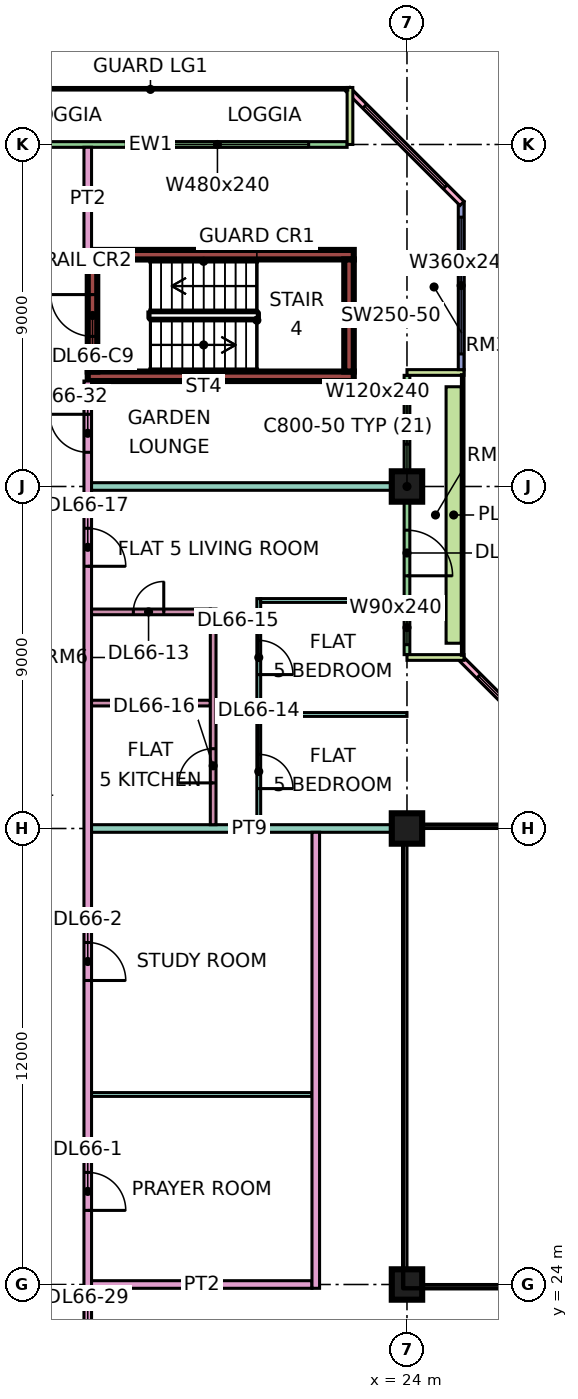
"""IFC4 building model, lengths in metres.
Left out: names, types, materials, properties, quantities, classifications, styles, units other than length and angle.
Written with IfcOpenShell. Run it as: python <this file> out.ifc"""

import sys

from ifc_helpers import new_model, si_unit, direction, frame, frame_2d, origin, origin_2d, place, context, subcontext, project, spatial, rectangle, extrude, element, fill, save


model = new_model("IFC4")
c1 = context("Model", 3, precision=1e-05, world=origin(), true_north=direction((0.0, 1.0)))
c2 = subcontext(c1, "Body", "Model", "MODEL_VIEW")
j1 = project(units=[si_unit("LENGTHUNIT", "METRE"), si_unit("PLANEANGLEUNIT", "RADIAN")], contexts=[c1])
p1 = place(None, origin())
s1 = spatial("IfcSite", under=j1, at=p1, CompositionType="ELEMENT")
p2 = place(p1, origin())
s2 = spatial("IfcBuilding", under=s1, at=p2, CompositionType="ELEMENT")
p3 = place(p2, frame((0.0, 0.0, 284.65)))
s3 = spatial("IfcBuildingStorey", under=s2, at=p3, CompositionType="ELEMENT", Elevation=284.65)
for number, where, z_axis, x_axis in (
    (1, (24.0, 24.0, 0.0), (0.0, 0.0, 1.0), (1.0, 0.0, 0.0)),
    (2, (24.0, 36.0, 0.0), (0.0, 0.0, 1.0), (1.0, 0.0, 0.0)),
    (3, (24.0, 45.0, 0.0), (0.0, 0.0, 1.0), (1.0, 0.0, 0.0)),
):
    element("IfcColumn", number, at=place(p3, frame(where, z_axis=z_axis, x_axis=x_axis)), inside=s3, PredefinedType="COLUMN", context=c2, shape_type="SweptSolid", body=[
        extrude(rectangle(XDim=0.8, YDim=0.8, at=origin_2d()), origin(), (0.0, 0.0, 1.0), 3.75),
    ])
for number, where, z_axis, x_axis in (
    (4, (15.6, 47.9, 0.0), (0.0, 0.0, 1.0), (1.0, 0.0, 0.0)),
    (5, (15.6, 51.1, 0.0), (0.0, 0.0, 1.0), (1.0, 0.0, 0.0)),
):
    element("IfcWall", number, at=place(p3, frame(where, z_axis=z_axis, x_axis=x_axis)), inside=s3, PredefinedType="SHEAR", context=c2, shape_type="SweptSolid", body=[
        extrude(rectangle(XDim=7.0, YDim=0.25, at=frame_2d((3.5, 0.0))), origin(), (0.0, 0.0, 1.0), 3.75),
    ])
p4 = place(p3, frame((15.725, 48.025, 0.0), z_axis=(0.0, 0.0, 1.0), x_axis=(0.0, 1.0, 0.0)))
e6 = element("IfcWall", 6, at=p4, inside=s3, PredefinedType="SHEAR", context=c2, shape_type="SweptSolid", body=[
    extrude(rectangle(XDim=2.95, YDim=0.25, at=frame_2d((1.475, 0.0))), origin(), (0.0, 0.0, 1.0), 3.75),
])
p5 = place(p4, frame((0.925, 0.0, 0.0)))
e7 = element("IfcOpeningElement", 7, at=p5, cuts=e6, PredefinedType="OPENING", context=c2, shape_type="SweptSolid", body=[
    extrude(rectangle(XDim=1.1, YDim=2.2, at=frame_2d((0.55, 1.1))), frame((0.0, 0.135, 0.0), z_axis=(0.0, -1.0, 0.0), x_axis=(1.0, 0.0, 0.0)), (0.0, 0.0, 1.0), 0.27),
])
p6 = place(p3, frame((22.475, 48.025, 0.0), z_axis=(0.0, 0.0, 1.0), x_axis=(0.0, 1.0, 0.0)))
e8 = element("IfcWall", 8, at=p6, inside=s3, PredefinedType="SHEAR", context=c2, shape_type="SweptSolid", body=[
    extrude(rectangle(XDim=2.95, YDim=0.25, at=frame_2d((1.475, 0.0))), origin(), (0.0, 0.0, 1.0), 3.75),
])
p7 = place(p3, frame((28.447, 37.447, 0.0), z_axis=(0.0, 0.0, 1.0), x_axis=(-0.707106781187, 0.707106781187, 0.0)))
e9 = element("IfcWall", 9, at=p7, inside=s3, PredefinedType="SOLIDWALL", context=c2, shape_type="SweptSolid", body=[
    extrude(rectangle(XDim=4.243, YDim=0.15, at=frame_2d((2.121, 0.0))), origin(), (0.0, 0.0, 1.0), 3.35),
])
p8 = place(p7, frame((0.621, 0.0, 0.45)))
e10 = element("IfcOpeningElement", 10, at=p8, cuts=e9, PredefinedType="OPENING", context=c2, shape_type="SweptSolid", body=[
    extrude(rectangle(XDim=3.0, YDim=2.4, at=frame_2d((1.5, 1.2))), frame((0.0, 0.085, 0.0), z_axis=(0.0, -1.0, 0.0), x_axis=(1.0, 0.0, 0.0)), (0.0, 0.0, 1.0), 0.17),
])
p9 = place(p3, frame((24.0, 40.575, 0.0), z_axis=(0.0, 0.0, 1.0), x_axis=(0.0, 1.0, 0.0)))
e11 = element("IfcWall", 11, at=p9, inside=s3, PredefinedType="SOLIDWALL", context=c2, shape_type="SweptSolid", body=[
    extrude(rectangle(XDim=7.35, YDim=0.15, at=frame_2d((3.675, 0.0))), origin(), (0.0, 0.0, 1.0), 3.35),
])
p10 = place(p9, frame((0.262, 0.0, 0.45)))
e12 = element("IfcOpeningElement", 12, at=p10, cuts=e11, PredefinedType="OPENING", context=c2, shape_type="SweptSolid", body=[
    extrude(rectangle(XDim=0.9, YDim=2.4, at=frame_2d((0.45, 1.2))), frame((0.0, 0.085, 0.0), z_axis=(0.0, -1.0, 0.0), x_axis=(1.0, 0.0, 0.0)), (0.0, 0.0, 1.0), 0.17),
])
p11 = place(p9, frame((2.075, 0.0, 0.0)))
e13 = element("IfcOpeningElement", 13, at=p11, cuts=e11, PredefinedType="OPENING", context=c2, shape_type="SweptSolid", body=[
    extrude(rectangle(XDim=1.2, YDim=2.4, at=frame_2d((0.6, 1.2))), frame((0.0, 0.085, 0.0), z_axis=(0.0, -1.0, 0.0), x_axis=(1.0, 0.0, 0.0)), (0.0, 0.0, 1.0), 0.17),
])
p12 = place(p9, frame((5.538, 0.0, 0.45)))
e14 = element("IfcOpeningElement", 14, at=p12, cuts=e11, PredefinedType="OPENING", context=c2, shape_type="SweptSolid", body=[
    extrude(rectangle(XDim=1.2, YDim=2.4, at=frame_2d((0.6, 1.2))), frame((0.0, 0.085, 0.0), z_axis=(0.0, -1.0, 0.0), x_axis=(1.0, 0.0, 0.0)), (0.0, 0.0, 1.0), 0.17),
])
for number, where, z_axis, x_axis in (
    (15, (25.5, 40.5, 0.0), (0.0, 0.0, 1.0), (-1.0, 0.0, 0.0)),
    (16, (25.5, 48.0, 0.0), (0.0, 0.0, 1.0), (-1.0, 0.0, 0.0)),
):
    element("IfcWall", number, at=place(p3, frame(where, z_axis=z_axis, x_axis=x_axis)), inside=s3, PredefinedType="SOLIDWALL", context=c2, shape_type="SweptSolid", body=[
        extrude(rectangle(XDim=1.5, YDim=0.15, at=frame_2d((0.75, 0.0))), origin(), (0.0, 0.0, 1.0), 3.35),
    ])
p13 = place(p3, frame((25.425, 48.075, 0.0), z_axis=(0.0, 0.0, 1.0), x_axis=(0.0, 1.0, 0.0)))
e17 = element("IfcWall", 17, at=p13, inside=s3, PredefinedType="SOLIDWALL", context=c2, shape_type="SweptSolid", body=[
    extrude(rectangle(XDim=4.425, YDim=0.15, at=frame_2d((2.212, 0.0))), origin(), (0.0, 0.0, 1.0), 3.35),
])
p14 = place(p13, frame((0.413, 0.0, 0.45)))
e18 = element("IfcOpeningElement", 18, at=p14, cuts=e17, PredefinedType="OPENING", context=c2, shape_type="SweptSolid", body=[
    extrude(rectangle(XDim=3.6, YDim=2.4, at=frame_2d((1.8, 1.2))), frame((0.0, 0.085, 0.0), z_axis=(0.0, -1.0, 0.0), x_axis=(1.0, 0.0, 0.0)), (0.0, 0.0, 1.0), 0.17),
])
p15 = place(p3, frame((25.447, 52.447, 0.0), z_axis=(0.0, 0.0, 1.0), x_axis=(-0.707106781187, 0.707106781187, 0.0)))
e19 = element("IfcWall", 19, at=p15, inside=s3, PredefinedType="SOLIDWALL", context=c2, shape_type="SweptSolid", body=[
    extrude(rectangle(XDim=4.243, YDim=0.15, at=frame_2d((2.121, 0.0))), origin(), (0.0, 0.0, 1.0), 3.35),
])
p16 = place(p15, frame((0.621, 0.0, 0.45)))
e20 = element("IfcOpeningElement", 20, at=p16, cuts=e19, PredefinedType="OPENING", context=c2, shape_type="SweptSolid", body=[
    extrude(rectangle(XDim=3.0, YDim=2.4, at=frame_2d((1.5, 1.2))), frame((0.0, 0.085, 0.0), z_axis=(0.0, -1.0, 0.0), x_axis=(1.0, 0.0, 0.0)), (0.0, 0.0, 1.0), 0.17),
])
p17 = place(p3, frame((22.425, 54.0, 0.0), z_axis=(0.0, 0.0, 1.0), x_axis=(-1.0, 0.0, 0.0)))
e21 = element("IfcWall", 21, at=p17, inside=s3, PredefinedType="SOLIDWALL", context=c2, shape_type="SweptSolid", body=[
    extrude(rectangle(XDim=10.35, YDim=0.15, at=frame_2d((5.175, 0.0))), origin(), (0.0, 0.0, 1.0), 3.35),
])
p18 = place(p17, frame((1.012, 0.0, 0.45)))
e22 = element("IfcOpeningElement", 22, at=p18, cuts=e21, PredefinedType="OPENING", context=c2, shape_type="SweptSolid", body=[
    extrude(rectangle(XDim=4.8, YDim=2.4, at=frame_2d((2.4, 1.2))), frame((0.0, 0.085, 0.0), z_axis=(0.0, -1.0, 0.0), x_axis=(1.0, 0.0, 0.0)), (0.0, 0.0, 1.0), 0.17),
])
p19 = place(p3, frame((22.5, 55.5, 0.0), z_axis=(0.0, 0.0, 1.0), x_axis=(0.0, -1.0, 0.0)))
e23 = element("IfcWall", 23, at=p19, inside=s3, PredefinedType="SOLIDWALL", context=c2, shape_type="SweptSolid", body=[
    extrude(rectangle(XDim=1.5, YDim=0.15, at=frame_2d((0.75, 0.0))), origin(), (0.0, 0.0, 1.0), 3.35),
])
p20 = place(p3, frame((25.229, 40.875, 0.0), z_axis=(0.0, 0.0, 1.0), x_axis=(0.0, 1.0, 0.0)))
e24 = element("IfcWall", 24, at=p20, inside=s3, PredefinedType="SOLIDWALL", context=c2, shape_type="SweptSolid", body=[
    extrude(rectangle(XDim=6.75, YDim=0.4, at=frame_2d((3.375, 0.0))), origin(), (0.0, 0.0, 1.0), 0.7),
])
p21 = place(p3, frame((15.6, 20.0, 0.0), z_axis=(0.0, 0.0, 1.0), x_axis=(0.0, 1.0, 0.0)))
e25 = element("IfcWall", 25, at=p21, inside=s3, PredefinedType="PARTITIONING", context=c2, shape_type="SweptSolid", body=[
    extrude(rectangle(XDim=27.775, YDim=0.2, at=frame_2d((13.887, 0.0))), origin(), (0.0, 0.0, 1.0), 3.35),
])
p22 = place(p21, frame((5.95, 0.0, 0.0)))
e26 = element("IfcOpeningElement", 26, at=p22, cuts=e25, PredefinedType="OPENING", context=c2, shape_type="SweptSolid", body=[
    extrude(rectangle(XDim=1.0, YDim=2.1, at=frame_2d((0.5, 1.05))), frame((0.0, 0.11, 0.0), z_axis=(0.0, -1.0, 0.0), x_axis=(1.0, 0.0, 0.0)), (0.0, 0.0, 1.0), 0.22),
])
p23 = place(p21, frame((12.0, 0.0, 0.0)))
e27 = element("IfcOpeningElement", 27, at=p23, cuts=e25, PredefinedType="OPENING", context=c2, shape_type="SweptSolid", body=[
    extrude(rectangle(XDim=1.0, YDim=2.1, at=frame_2d((0.5, 1.05))), frame((0.0, 0.11, 0.0), z_axis=(0.0, -1.0, 0.0), x_axis=(1.0, 0.0, 0.0)), (0.0, 0.0, 1.0), 0.22),
])
p24 = place(p21, frame((22.9, 0.0, 0.0)))
e28 = element("IfcOpeningElement", 28, at=p24, cuts=e25, PredefinedType="OPENING", context=c2, shape_type="SweptSolid", body=[
    extrude(rectangle(XDim=1.0, YDim=2.1, at=frame_2d((0.5, 1.05))), frame((0.0, 0.11, 0.0), z_axis=(0.0, -1.0, 0.0), x_axis=(1.0, 0.0, 0.0)), (0.0, 0.0, 1.0), 0.22),
])
p25 = place(p21, frame((1.15, 0.0, 0.0)))
e29 = element("IfcOpeningElement", 29, at=p25, cuts=e25, PredefinedType="OPENING", context=c2, shape_type="SweptSolid", body=[
    extrude(rectangle(XDim=1.8, YDim=2.1, at=frame_2d((0.9, 1.05))), frame((0.0, 0.11, 0.0), z_axis=(0.0, -1.0, 0.0), x_axis=(1.0, 0.0, 0.0)), (0.0, 0.0, 1.0), 0.22),
])
p26 = place(p21, frame((25.9, 0.0, 0.0)))
e30 = element("IfcOpeningElement", 30, at=p26, cuts=e25, PredefinedType="OPENING", context=c2, shape_type="SweptSolid", body=[
    extrude(rectangle(XDim=1.0, YDim=2.1, at=frame_2d((0.5, 1.05))), frame((0.0, 0.11, 0.0), z_axis=(0.0, -1.0, 0.0), x_axis=(1.0, 0.0, 0.0)), (0.0, 0.0, 1.0), 0.22),
])
p27 = place(p3, frame((15.6, 51.225, 0.0), z_axis=(0.0, 0.0, 1.0), x_axis=(0.0, 1.0, 0.0)))
e31 = element("IfcWall", 31, at=p27, inside=s3, PredefinedType="PARTITIONING", context=c2, shape_type="SweptSolid", body=[
    extrude(rectangle(XDim=2.701, YDim=0.2, at=frame_2d((1.351, 0.0))), origin(), (0.0, 0.0, 1.0), 3.35),
])
p28 = place(p3, frame((15.7, 24.0, 0.0), z_axis=(0.0, 0.0, 1.0), x_axis=(1.0, 0.0, 0.0)))
e32 = element("IfcWall", 32, at=p28, inside=s3, PredefinedType="PARTITIONING", context=c2, shape_type="SweptSolid", body=[
    extrude(rectangle(XDim=5.8, YDim=0.2, at=frame_2d((2.9, 0.0))), origin(), (0.0, 0.0, 1.0), 3.35),
])
p29 = place(p3, frame((15.7, 29.0, 0.0), z_axis=(0.0, 0.0, 1.0), x_axis=(1.0, 0.0, 0.0)))
e33 = element("IfcWall", 33, at=p29, inside=s3, PredefinedType="PARTITIONING", context=c2, shape_type="SweptSolid", body=[
    extrude(rectangle(XDim=5.8, YDim=0.1, at=frame_2d((2.9, 0.0))), origin(), (0.0, 0.0, 1.0), 3.35),
])
p30 = place(p3, frame((15.7, 36.0, 0.0), z_axis=(0.0, 0.0, 1.0), x_axis=(1.0, 0.0, 0.0)))
e34 = element("IfcWall", 34, at=p30, inside=s3, PredefinedType="PARTITIONING", context=c2, shape_type="SweptSolid", body=[
    extrude(rectangle(XDim=8.3, YDim=0.2, at=frame_2d((4.15, 0.0))), origin(), (0.0, 0.0, 1.0), 3.35),
])
p31 = place(p3, frame((15.7, 39.3, 0.0), z_axis=(0.0, 0.0, 1.0), x_axis=(1.0, 0.0, 0.0)))
e35 = element("IfcWall", 35, at=p31, inside=s3, PredefinedType="PARTITIONING", context=c2, shape_type="SweptSolid", body=[
    extrude(rectangle(XDim=3.125, YDim=0.15, at=frame_2d((1.562, 0.0))), origin(), (0.0, 0.0, 1.0), 3.35),
])
p32 = place(p3, frame((15.7, 41.7, 0.0), z_axis=(0.0, 0.0, 1.0), x_axis=(1.0, 0.0, 0.0)))
e36 = element("IfcWall", 36, at=p32, inside=s3, PredefinedType="PARTITIONING", context=c2, shape_type="SweptSolid", body=[
    extrude(rectangle(XDim=3.125, YDim=0.15, at=frame_2d((1.562, 0.0))), origin(), (0.0, 0.0, 1.0), 3.35),
])
p33 = place(p32, frame((1.1, 0.0, 0.0)))
e37 = element("IfcOpeningElement", 37, at=p33, cuts=e36, PredefinedType="OPENING", context=c2, shape_type="SweptSolid", body=[
    extrude(rectangle(XDim=0.8, YDim=2.1, at=frame_2d((0.4, 1.05))), frame((0.0, 0.085, 0.0), z_axis=(0.0, -1.0, 0.0), x_axis=(1.0, 0.0, 0.0)), (0.0, 0.0, 1.0), 0.17),
])
p34 = place(p3, frame((15.7, 45.0, 0.0), z_axis=(0.0, 0.0, 1.0), x_axis=(1.0, 0.0, 0.0)))
e38 = element("IfcWall", 38, at=p34, inside=s3, PredefinedType="PARTITIONING", context=c2, shape_type="SweptSolid", body=[
    extrude(rectangle(XDim=8.226, YDim=0.2, at=frame_2d((4.113, 0.0))), origin(), (0.0, 0.0, 1.0), 3.35),
])
p35 = place(p3, frame((18.9, 36.1, 0.0), z_axis=(0.0, 0.0, 1.0), x_axis=(0.0, 1.0, 0.0)))
e39 = element("IfcWall", 39, at=p35, inside=s3, PredefinedType="PARTITIONING", context=c2, shape_type="SweptSolid", body=[
    extrude(rectangle(XDim=5.675, YDim=0.15, at=frame_2d((2.837, 0.0))), origin(), (0.0, 0.0, 1.0), 3.35),
])
p36 = place(p35, frame((1.1, 0.0, 0.0)))
e40 = element("IfcOpeningElement", 40, at=p36, cuts=e39, PredefinedType="OPENING", context=c2, shape_type="SweptSolid", body=[
    extrude(rectangle(XDim=0.9, YDim=2.1, at=frame_2d((0.45, 1.05))), frame((0.0, 0.085, 0.0), z_axis=(0.0, -1.0, 0.0), x_axis=(1.0, 0.0, 0.0)), (0.0, 0.0, 1.0), 0.17),
])
p37 = place(p3, frame((20.1, 36.1, 0.0), z_axis=(0.0, 0.0, 1.0), x_axis=(0.0, 1.0, 0.0)))
e41 = element("IfcWall", 41, at=p37, inside=s3, PredefinedType="PARTITIONING", context=c2, shape_type="SweptSolid", body=[
    extrude(rectangle(XDim=5.95, YDim=0.1, at=frame_2d((2.975, 0.0))), origin(), (0.0, 0.0, 1.0), 3.35),
])
p38 = place(p37, frame((0.95, 0.0, 0.0)))
e42 = element("IfcOpeningElement", 42, at=p38, cuts=e41, PredefinedType="OPENING", context=c2, shape_type="SweptSolid", body=[
    extrude(rectangle(XDim=0.9, YDim=2.1, at=frame_2d((0.45, 1.05))), frame((0.0, 0.06, 0.0), z_axis=(0.0, -1.0, 0.0), x_axis=(1.0, 0.0, 0.0)), (0.0, 0.0, 1.0), 0.12),
])
p39 = place(p37, frame((3.95, 0.0, 0.0)))
e43 = element("IfcOpeningElement", 43, at=p39, cuts=e41, PredefinedType="OPENING", context=c2, shape_type="SweptSolid", body=[
    extrude(rectangle(XDim=0.9, YDim=2.1, at=frame_2d((0.45, 1.05))), frame((0.0, 0.06, 0.0), z_axis=(0.0, -1.0, 0.0), x_axis=(1.0, 0.0, 0.0)), (0.0, 0.0, 1.0), 0.12),
])
p40 = place(p3, frame((20.15, 39.0, 0.0), z_axis=(0.0, 0.0, 1.0), x_axis=(1.0, 0.0, 0.0)))
e44 = element("IfcWall", 44, at=p40, inside=s3, PredefinedType="PARTITIONING", context=c2, shape_type="SweptSolid", body=[
    extrude(rectangle(XDim=3.85, YDim=0.1, at=frame_2d((1.925, 0.0))), origin(), (0.0, 0.0, 1.0), 3.35),
])
p41 = place(p3, frame((20.15, 42.0, 0.0), z_axis=(0.0, 0.0, 1.0), x_axis=(1.0, 0.0, 0.0)))
e45 = element("IfcWall", 45, at=p41, inside=s3, PredefinedType="PARTITIONING", context=c2, shape_type="SweptSolid", body=[
    extrude(rectangle(XDim=3.776, YDim=0.1, at=frame_2d((1.888, 0.0))), origin(), (0.0, 0.0, 1.0), 3.35),
])
p42 = place(p3, frame((21.6, 23.9, 0.0), z_axis=(0.0, 0.0, 1.0), x_axis=(0.0, 1.0, 0.0)))
e46 = element("IfcWall", 46, at=p42, inside=s3, PredefinedType="PARTITIONING", context=c2, shape_type="SweptSolid", body=[
    extrude(rectangle(XDim=12.0, YDim=0.2, at=frame_2d((6.0, 0.0))), origin(), (0.0, 0.0, 1.0), 3.35),
])
p43 = place(p8, origin())
e47 = element("IfcWindow", 47, at=p43, inside=s3, PartitioningType="SINGLE_PANEL", PredefinedType="WINDOW", context=c2, shape_type="SweptSolid", body=[
    extrude(rectangle(XDim=3.0, YDim=2.4, at=frame_2d((1.5, 1.2))), frame((0.0, 0.03, 0.0), z_axis=(0.0, -1.0, 0.0), x_axis=(1.0, 0.0, 0.0)), (0.0, 0.0, 1.0), 0.06),
])
fill(e10, e47)
p44 = place(p10, origin())
e48 = element("IfcWindow", 48, at=p44, inside=s3, PartitioningType="SINGLE_PANEL", PredefinedType="WINDOW", context=c2, shape_type="SweptSolid", body=[
    extrude(rectangle(XDim=0.9, YDim=2.4, at=frame_2d((0.45, 1.2))), frame((0.0, 0.03, 0.0), z_axis=(0.0, -1.0, 0.0), x_axis=(1.0, 0.0, 0.0)), (0.0, 0.0, 1.0), 0.06),
])
fill(e12, e48)
p45 = place(p11, frame((1.2, 0.0, 0.0), z_axis=(0.0, 0.0, 1.0), x_axis=(-1.0, 0.0, 0.0)))
e49 = element("IfcDoor", 49, at=p45, inside=s3, OperationType="DOUBLE_DOOR_SINGLE_SWING", PredefinedType="DOOR", context=c2, shape_type="SweptSolid", body=[
    extrude(rectangle(XDim=1.2, YDim=2.4, at=frame_2d((0.6, 1.2))), frame((0.0, 0.025, 0.0), z_axis=(0.0, -1.0, 0.0), x_axis=(1.0, 0.0, 0.0)), (0.0, 0.0, 1.0), 0.05),
])
fill(e13, e49)
p46 = place(p12, origin())
e50 = element("IfcWindow", 50, at=p46, inside=s3, PartitioningType="SINGLE_PANEL", PredefinedType="WINDOW", context=c2, shape_type="SweptSolid", body=[
    extrude(rectangle(XDim=1.2, YDim=2.4, at=frame_2d((0.6, 1.2))), frame((0.0, 0.03, 0.0), z_axis=(0.0, -1.0, 0.0), x_axis=(1.0, 0.0, 0.0)), (0.0, 0.0, 1.0), 0.06),
])
fill(e14, e50)
p47 = place(p14, origin())
e51 = element("IfcWindow", 51, at=p47, inside=s3, PartitioningType="SINGLE_PANEL", PredefinedType="WINDOW", context=c2, shape_type="SweptSolid", body=[
    extrude(rectangle(XDim=3.6, YDim=2.4, at=frame_2d((1.8, 1.2))), frame((0.0, 0.03, 0.0), z_axis=(0.0, -1.0, 0.0), x_axis=(1.0, 0.0, 0.0)), (0.0, 0.0, 1.0), 0.06),
])
fill(e18, e51)
p48 = place(p16, origin())
e52 = element("IfcWindow", 52, at=p48, inside=s3, PartitioningType="SINGLE_PANEL", PredefinedType="WINDOW", context=c2, shape_type="SweptSolid", body=[
    extrude(rectangle(XDim=3.0, YDim=2.4, at=frame_2d((1.5, 1.2))), frame((0.0, 0.03, 0.0), z_axis=(0.0, -1.0, 0.0), x_axis=(1.0, 0.0, 0.0)), (0.0, 0.0, 1.0), 0.06),
])
fill(e20, e52)
p49 = place(p18, origin())
e53 = element("IfcWindow", 53, at=p49, inside=s3, PartitioningType="SINGLE_PANEL", PredefinedType="WINDOW", context=c2, shape_type="SweptSolid", body=[
    extrude(rectangle(XDim=4.8, YDim=2.4, at=frame_2d((2.4, 1.2))), frame((0.0, 0.03, 0.0), z_axis=(0.0, -1.0, 0.0), x_axis=(1.0, 0.0, 0.0)), (0.0, 0.0, 1.0), 0.06),
])
fill(e22, e53)
p50 = place(p5, frame((1.1, 0.0, 0.0), z_axis=(0.0, 0.0, 1.0), x_axis=(-1.0, 0.0, 0.0)))
e54 = element("IfcDoor", 54, at=p50, inside=s3, OperationType="SINGLE_SWING_RIGHT", PredefinedType="DOOR", context=c2, shape_type="SweptSolid", body=[
    extrude(rectangle(XDim=1.1, YDim=2.2, at=frame_2d((0.55, 1.1))), frame((0.0, 0.025, 0.0), z_axis=(0.0, -1.0, 0.0), x_axis=(1.0, 0.0, 0.0)), (0.0, 0.0, 1.0), 0.05),
])
fill(e7, e54)
p51 = place(p22, frame((1.0, 0.0, 0.0), z_axis=(0.0, 0.0, 1.0), x_axis=(-1.0, 0.0, 0.0)))
e55 = element("IfcDoor", 55, at=p51, inside=s3, OperationType="SINGLE_SWING_LEFT", PredefinedType="DOOR", context=c2, shape_type="SweptSolid", body=[
    extrude(rectangle(XDim=1.0, YDim=2.1, at=frame_2d((0.5, 1.05))), frame((0.0, 0.025, 0.0), z_axis=(0.0, -1.0, 0.0), x_axis=(1.0, 0.0, 0.0)), (0.0, 0.0, 1.0), 0.05),
])
fill(e26, e55)
p52 = place(p23, frame((1.0, 0.0, 0.0), z_axis=(0.0, 0.0, 1.0), x_axis=(-1.0, 0.0, 0.0)))
e56 = element("IfcDoor", 56, at=p52, inside=s3, OperationType="SINGLE_SWING_LEFT", PredefinedType="DOOR", context=c2, shape_type="SweptSolid", body=[
    extrude(rectangle(XDim=1.0, YDim=2.1, at=frame_2d((0.5, 1.05))), frame((0.0, 0.025, 0.0), z_axis=(0.0, -1.0, 0.0), x_axis=(1.0, 0.0, 0.0)), (0.0, 0.0, 1.0), 0.05),
])
fill(e27, e56)
p53 = place(p33, frame((0.8, 0.0, 0.0), z_axis=(0.0, 0.0, 1.0), x_axis=(-1.0, 0.0, 0.0)))
e57 = element("IfcDoor", 57, at=p53, inside=s3, OperationType="SINGLE_SWING_RIGHT", PredefinedType="DOOR", context=c2, shape_type="SweptSolid", body=[
    extrude(rectangle(XDim=0.8, YDim=2.1, at=frame_2d((0.4, 1.05))), frame((0.0, 0.025, 0.0), z_axis=(0.0, -1.0, 0.0), x_axis=(1.0, 0.0, 0.0)), (0.0, 0.0, 1.0), 0.05),
])
fill(e37, e57)
p54 = place(p38, frame((0.9, 0.0, 0.0), z_axis=(0.0, 0.0, 1.0), x_axis=(-1.0, 0.0, 0.0)))
e58 = element("IfcDoor", 58, at=p54, inside=s3, OperationType="SINGLE_SWING_LEFT", PredefinedType="DOOR", context=c2, shape_type="SweptSolid", body=[
    extrude(rectangle(XDim=0.9, YDim=2.1, at=frame_2d((0.45, 1.05))), frame((0.0, 0.025, 0.0), z_axis=(0.0, -1.0, 0.0), x_axis=(1.0, 0.0, 0.0)), (0.0, 0.0, 1.0), 0.05),
])
fill(e42, e58)
p55 = place(p39, frame((0.9, 0.0, 0.0), z_axis=(0.0, 0.0, 1.0), x_axis=(-1.0, 0.0, 0.0)))
e59 = element("IfcDoor", 59, at=p55, inside=s3, OperationType="SINGLE_SWING_LEFT", PredefinedType="DOOR", context=c2, shape_type="SweptSolid", body=[
    extrude(rectangle(XDim=0.9, YDim=2.1, at=frame_2d((0.45, 1.05))), frame((0.0, 0.025, 0.0), z_axis=(0.0, -1.0, 0.0), x_axis=(1.0, 0.0, 0.0)), (0.0, 0.0, 1.0), 0.05),
])
fill(e43, e59)
p56 = place(p36, origin())
e60 = element("IfcDoor", 60, at=p56, inside=s3, OperationType="SINGLE_SWING_LEFT", PredefinedType="DOOR", context=c2, shape_type="SweptSolid", body=[
    extrude(rectangle(XDim=0.9, YDim=2.1, at=frame_2d((0.45, 1.05))), frame((0.0, 0.025, 0.0), z_axis=(0.0, -1.0, 0.0), x_axis=(1.0, 0.0, 0.0)), (0.0, 0.0, 1.0), 0.05),
])
fill(e40, e60)
p57 = place(p24, frame((1.0, 0.0, 0.0), z_axis=(0.0, 0.0, 1.0), x_axis=(-1.0, 0.0, 0.0)))
e61 = element("IfcDoor", 61, at=p57, inside=s3, OperationType="SINGLE_SWING_LEFT", PredefinedType="DOOR", context=c2, shape_type="SweptSolid", body=[
    extrude(rectangle(XDim=1.0, YDim=2.1, at=frame_2d((0.5, 1.05))), frame((0.0, 0.025, 0.0), z_axis=(0.0, -1.0, 0.0), x_axis=(1.0, 0.0, 0.0)), (0.0, 0.0, 1.0), 0.05),
])
fill(e28, e61)
p58 = place(p26, frame((1.0, 0.0, 0.0), z_axis=(0.0, 0.0, 1.0), x_axis=(-1.0, 0.0, 0.0)))
e62 = element("IfcDoor", 62, at=p58, inside=s3, OperationType="SINGLE_SWING_RIGHT", PredefinedType="DOOR", context=c2, shape_type="SweptSolid", body=[
    extrude(rectangle(XDim=1.0, YDim=2.1, at=frame_2d((0.5, 1.05))), frame((0.0, 0.025, 0.0), z_axis=(0.0, -1.0, 0.0), x_axis=(1.0, 0.0, 0.0)), (0.0, 0.0, 1.0), 0.05),
])
fill(e30, e62)
save(model, sys.argv[1])
